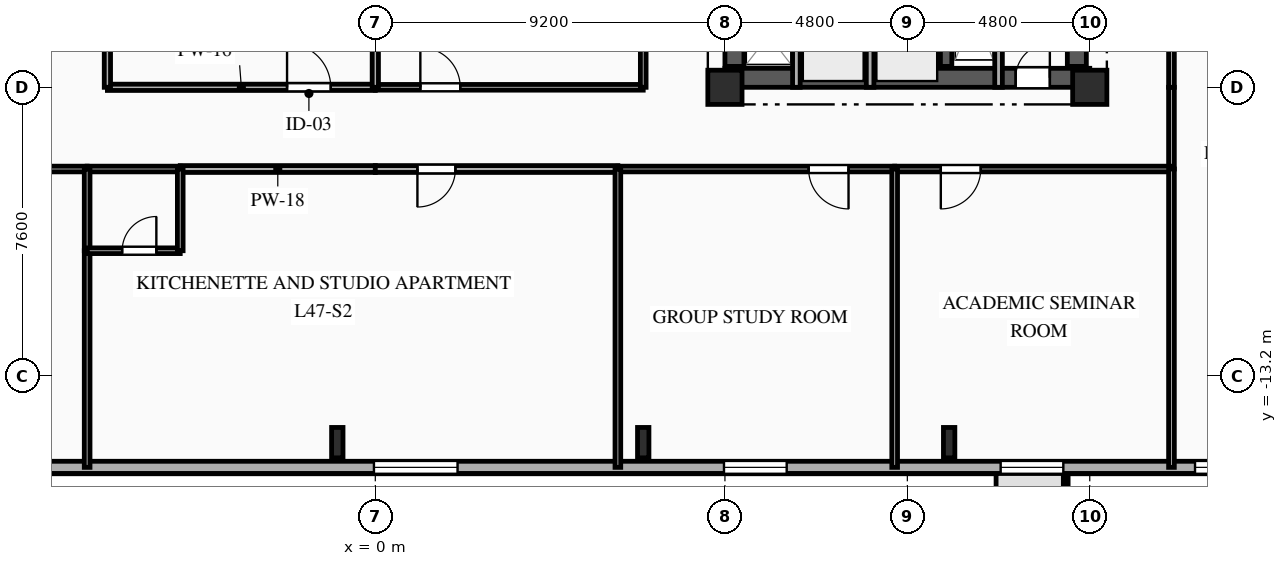
"""IFC4 building model, lengths in metres.
Left out: names, types, materials, properties, quantities, classifications, styles, units other than length and angle.
Written with IfcOpenShell. Run it as: python <this file> out.ifc"""

import sys

from ifc_helpers import new_model, si_unit, direction, frame, frame_2d, origin, origin_2d, place, context, subcontext, project, spatial, rectangle, i_section, extrude, element, fill, save


model = new_model("IFC4")
c1 = context("Model", 3, precision=1e-05, world=origin(), true_north=direction((0.0, 1.0)))
c2 = subcontext(c1, "Body", "Model", "MODEL_VIEW")
j1 = project(units=[si_unit("LENGTHUNIT", "METRE"), si_unit("PLANEANGLEUNIT", "RADIAN")], contexts=[c1])
p1 = place(None, origin())
s1 = spatial("IfcSite", under=j1, at=p1, CompositionType="ELEMENT")
p2 = place(p1, origin())
s2 = spatial("IfcBuilding", under=s1, at=p2, CompositionType="ELEMENT")
p3 = place(p2, frame((0.0, 0.0, 167.85)))
s3 = spatial("IfcBuildingStorey", under=s2, at=p3, CompositionType="ELEMENT", Elevation=167.85)
for number, where, z_axis, x_axis in (
    (1, (9.2, -5.6, 0.0), (0.0, 0.0, 1.0), (1.0, 0.0, 0.0)),
    (2, (18.8, -5.6, 0.0), (0.0, 0.0, 1.0), (1.0, 0.0, 0.0)),
):
    element("IfcColumn", number, at=place(p3, frame(where, z_axis=z_axis, x_axis=x_axis)), inside=s3, PredefinedType="COLUMN", context=c2, shape_type="SweptSolid", body=[
        extrude(rectangle(XDim=0.9, YDim=0.9, at=origin_2d()), origin(), (0.0, 0.0, 1.0), 3.35),
    ])
for number, where, z_axis, x_axis in (
    (3, (-1.0, -14.95, 0.0), (0.0, 0.0, 1.0), (1.0, 0.0, 0.0)),
    (4, (7.05, -14.95, 0.0), (0.0, 0.0, 1.0), (1.0, 0.0, 0.0)),
    (5, (15.1, -14.95, 0.0), (0.0, 0.0, 1.0), (1.0, 0.0, 0.0)),
):
    element("IfcColumn", number, at=place(p3, frame(where, z_axis=z_axis, x_axis=x_axis)), inside=s3, PredefinedType="COLUMN", context=c2, shape_type="SweptSolid", body=[
        extrude(i_section(OverallWidth=0.3, OverallDepth=0.8, WebThickness=0.018, FlangeThickness=0.033, FilletRadius=0.03, at=origin_2d()), origin(), (0.0, 0.0, 1.0), 3.35),
    ])
p4 = place(p3, frame((23.8, -15.6, 0.0), z_axis=(0.0, 0.0, 1.0), x_axis=(-1.0, 0.0, 0.0)))
e6 = element("IfcWall", 6, at=p4, inside=s3, PredefinedType="SOLIDWALL", context=c2, shape_type="SweptSolid", body=[
    extrude(rectangle(XDim=49.6, YDim=0.32, at=frame_2d((24.8, 0.0))), origin(), (0.0, 0.0, 1.0), 3.04),
])
p5 = place(p4, frame((1.13, 0.0, 0.85)))
e7 = element("IfcOpeningElement", 7, at=p5, cuts=e6, PredefinedType="OPENING", context=c2, shape_type="SweptSolid", body=[
    extrude(rectangle(XDim=1.1, YDim=1.85, at=frame_2d((0.55, 0.925))), frame((0.0, 0.17, 0.0), z_axis=(0.0, -1.0, 0.0), x_axis=(1.0, 0.0, 0.0)), (0.0, 0.0, 1.0), 0.34),
])
p6 = place(p4, frame((5.695, 0.0, 0.85)))
e8 = element("IfcOpeningElement", 8, at=p6, cuts=e6, PredefinedType="OPENING", context=c2, shape_type="SweptSolid", body=[
    extrude(rectangle(XDim=1.65, YDim=1.85, at=frame_2d((0.825, 0.925))), frame((0.0, 0.17, 0.0), z_axis=(0.0, -1.0, 0.0), x_axis=(1.0, 0.0, 0.0)), (0.0, 0.0, 1.0), 0.34),
])
p7 = place(p4, frame((12.975, 0.0, 0.85)))
e9 = element("IfcOpeningElement", 9, at=p7, cuts=e6, PredefinedType="OPENING", context=c2, shape_type="SweptSolid", body=[
    extrude(rectangle(XDim=1.65, YDim=1.85, at=frame_2d((0.825, 0.925))), frame((0.0, 0.17, 0.0), z_axis=(0.0, -1.0, 0.0), x_axis=(1.0, 0.0, 0.0)), (0.0, 0.0, 1.0), 0.34),
])
p8 = place(p4, frame((21.636, 0.0, 0.85)))
e10 = element("IfcOpeningElement", 10, at=p8, cuts=e6, PredefinedType="OPENING", context=c2, shape_type="SweptSolid", body=[
    extrude(rectangle(XDim=2.2, YDim=1.85, at=frame_2d((1.1, 0.925))), frame((0.0, 0.17, 0.0), z_axis=(0.0, -1.0, 0.0), x_axis=(1.0, 0.0, 0.0)), (0.0, 0.0, 1.0), 0.34),
])
p9 = place(p4, frame((33.935, 0.0, 0.85)))
e11 = element("IfcOpeningElement", 11, at=p9, cuts=e6, PredefinedType="OPENING", context=c2, shape_type="SweptSolid", body=[
    extrude(rectangle(XDim=1.65, YDim=1.85, at=frame_2d((0.825, 0.925))), frame((0.0, 0.17, 0.0), z_axis=(0.0, -1.0, 0.0), x_axis=(1.0, 0.0, 0.0)), (0.0, 0.0, 1.0), 0.34),
])
p10 = place(p4, frame((41.24, 0.0, 0.85)))
e12 = element("IfcOpeningElement", 12, at=p10, cuts=e6, PredefinedType="OPENING", context=c2, shape_type="SweptSolid", body=[
    extrude(rectangle(XDim=1.65, YDim=1.85, at=frame_2d((0.825, 0.925))), frame((0.0, 0.17, 0.0), z_axis=(0.0, -1.0, 0.0), x_axis=(1.0, 0.0, 0.0)), (0.0, 0.0, 1.0), 0.34),
])
p11 = place(p4, frame((46.175, 0.0, 0.85)))
e13 = element("IfcOpeningElement", 13, at=p11, cuts=e6, PredefinedType="OPENING", context=c2, shape_type="SweptSolid", body=[
    extrude(rectangle(XDim=1.65, YDim=1.85, at=frame_2d((0.825, 0.925))), frame((0.0, 0.17, 0.0), z_axis=(0.0, -1.0, 0.0), x_axis=(1.0, 0.0, 0.0)), (0.0, 0.0, 1.0), 0.34),
])
p12 = place(p3, frame((9.2, -5.35, 0.0), z_axis=(0.0, 0.0, 1.0), x_axis=(1.0, 0.0, 0.0)))
e14 = element("IfcWall", 14, at=p12, inside=s3, PredefinedType="SHEAR", context=c2, shape_type="SweptSolid", body=[
    extrude(rectangle(XDim=9.6, YDim=0.5, at=frame_2d((4.8, 0.0))), origin(), (0.0, 0.0, 1.0), 3.04),
])
p13 = place(p12, frame((7.65, 0.0, 0.0)))
e15 = element("IfcOpeningElement", 15, at=p13, cuts=e14, PredefinedType="OPENING", context=c2, shape_type="SweptSolid", body=[
    extrude(rectangle(XDim=0.9, YDim=2.1, at=frame_2d((0.45, 1.05))), frame((0.0, 0.26, 0.0), z_axis=(0.0, -1.0, 0.0), x_axis=(1.0, 0.0, 0.0)), (0.0, 0.0, 1.0), 0.52),
])
p14 = place(p3, frame((9.45, -5.05, 0.0), z_axis=(0.0, 0.0, 1.0), x_axis=(0.0, 1.0, 0.0)))
e16 = element("IfcWall", 16, at=p14, inside=s3, PredefinedType="SHEAR", context=c2, shape_type="SweptSolid", body=[
    extrude(rectangle(XDim=10.1, YDim=0.5, at=frame_2d((5.05, 0.0))), origin(), (0.0, 0.0, 1.0), 3.04),
])
p15 = place(p14, frame((7.15, 0.0, 0.0)))
e17 = element("IfcOpeningElement", 17, at=p15, cuts=e16, PredefinedType="OPENING", context=c2, shape_type="SweptSolid", body=[
    extrude(rectangle(XDim=0.9, YDim=2.1, at=frame_2d((0.45, 1.05))), frame((0.0, 0.26, 0.0), z_axis=(0.0, -1.0, 0.0), x_axis=(1.0, 0.0, 0.0)), (0.0, 0.0, 1.0), 0.52),
])
p16 = place(p14, frame((2.4, 0.0, 0.0)))
e18 = element("IfcOpeningElement", 18, at=p16, cuts=e16, PredefinedType="OPENING", context=c2, shape_type="SweptSolid", body=[
    extrude(rectangle(XDim=1.2, YDim=2.15, at=frame_2d((0.6, 1.075))), frame((0.0, 0.26, 0.0), z_axis=(0.0, -1.0, 0.0), x_axis=(1.0, 0.0, 0.0)), (0.0, 0.0, 1.0), 0.52),
])
p17 = place(p3, frame((18.46, -5.05, 0.0), z_axis=(0.0, 0.0, 1.0), x_axis=(0.0, 1.0, 0.0)))
e19 = element("IfcWall", 19, at=p17, inside=s3, PredefinedType="SHEAR", context=c2, shape_type="SweptSolid", body=[
    extrude(rectangle(XDim=10.1, YDim=0.5, at=frame_2d((5.05, 0.0))), origin(), (0.0, 0.0, 1.0), 3.04),
])
p18 = place(p3, frame((15.02, -5.05, 0.0), z_axis=(0.0, 0.0, 1.0), x_axis=(0.0, 1.0, 0.0)))
e20 = element("IfcWall", 20, at=p18, inside=s3, PredefinedType="SHEAR", context=c2, shape_type="SweptSolid", body=[
    extrude(rectangle(XDim=10.1, YDim=0.3, at=frame_2d((5.05, 0.0))), origin(), (0.0, 0.0, 1.0), 3.04),
])
p19 = place(p3, frame((16.4, -2.11, 0.0), z_axis=(0.0, 0.0, 1.0), x_axis=(0.0, -1.0, 0.0)))
e21 = element("IfcWall", 21, at=p19, inside=s3, PredefinedType="PARTITIONING", context=c2, shape_type="SweptSolid", body=[
    extrude(rectangle(XDim=3.49, YDim=0.2, at=frame_2d((1.745, 0.0))), origin(), (0.0, 0.0, 1.0), 3.04),
])
for number, where, z_axis, x_axis in (
    (22, (11.08, -5.6, 0.0), (0.0, 0.0, 1.0), (0.0, 1.0, 0.0)),
    (23, (13.02, -5.6, 0.0), (0.0, 0.0, 1.0), (0.0, 1.0, 0.0)),
):
    element("IfcWall", number, at=place(p3, frame(where, z_axis=z_axis, x_axis=x_axis)), inside=s3, PredefinedType="PARTITIONING", context=c2, shape_type="SweptSolid", body=[
        extrude(rectangle(XDim=2.25, YDim=0.2, at=frame_2d((1.125, 0.0))), origin(), (0.0, 0.0, 1.0), 3.04),
    ])
p20 = place(p3, frame((-7.583, -7.75, 0.0), z_axis=(0.0, 0.0, 1.0), x_axis=(-1.0, 0.0, 0.0)))
e24 = element("IfcWall", 24, at=p20, inside=s3, PredefinedType="PARTITIONING", context=c2, shape_type="SweptSolid", body=[
    extrude(rectangle(XDim=6.684, YDim=0.15, at=frame_2d((3.342, 0.0))), origin(), (0.0, 0.0, 1.0), 3.04),
])
p21 = place(p20, frame((4.494, 0.0, 0.0)))
e25 = element("IfcOpeningElement", 25, at=p21, cuts=e24, PredefinedType="OPENING", context=c2, shape_type="SweptSolid", body=[
    extrude(rectangle(XDim=1.05, YDim=2.15, at=frame_2d((0.525, 1.075))), frame((0.0, 0.085, 0.0), z_axis=(0.0, -1.0, 0.0), x_axis=(1.0, 0.0, 0.0)), (0.0, 0.0, 1.0), 0.17),
])
p22 = place(p3, frame((0.0, -7.75, 0.0), z_axis=(0.0, 0.0, 1.0), x_axis=(-1.0, 0.0, 0.0)))
e26 = element("IfcWall", 26, at=p22, inside=s3, PredefinedType="PARTITIONING", context=c2, shape_type="SweptSolid", body=[
    extrude(rectangle(XDim=5.133, YDim=0.18, at=frame_2d((2.566, 0.0))), origin(), (0.0, 0.0, 1.0), 3.04),
])
p23 = place(p3, frame((-5.133, -7.75, 0.0), z_axis=(0.0, 0.0, 1.0), x_axis=(-1.0, 0.0, 0.0)))
e27 = element("IfcWall", 27, at=p23, inside=s3, PredefinedType="PLUMBINGWALL", context=c2, shape_type="SweptSolid", body=[
    extrude(rectangle(XDim=2.45, YDim=0.15, at=frame_2d((1.225, 0.0))), origin(), (0.0, 0.0, 1.0), 3.04),
])
p24 = place(p3, frame((-7.05, -5.6, 0.0), z_axis=(0.0, 0.0, 1.0), x_axis=(1.0, 0.0, 0.0)))
e28 = element("IfcWall", 28, at=p24, inside=s3, PredefinedType="PARTITIONING", context=c2, shape_type="SweptSolid", body=[
    extrude(rectangle(XDim=7.05, YDim=0.165, at=frame_2d((3.525, 0.0))), origin(), (0.0, 0.0, 1.0), 2.525),
])
p25 = place(p24, frame((4.728, 0.0, 0.0)))
e29 = element("IfcOpeningElement", 29, at=p25, cuts=e28, PredefinedType="OPENING", context=c2, shape_type="SweptSolid", body=[
    extrude(rectangle(XDim=1.15, YDim=2.15, at=frame_2d((0.575, 1.075))), frame((0.0, 0.093, 0.0), z_axis=(0.0, -1.0, 0.0), x_axis=(1.0, 0.0, 0.0)), (0.0, 0.0, 1.0), 0.185),
])
p26 = place(p3, frame((20.95, -5.6, 0.0), z_axis=(0.0, 0.0, 1.0), x_axis=(0.0, -1.0, 0.0)))
e30 = element("IfcWall", 30, at=p26, inside=s3, PredefinedType="PARTITIONING", context=c2, shape_type="SweptSolid", body=[
    extrude(rectangle(XDim=2.15, YDim=0.15, at=frame_2d((1.075, 0.0))), origin(), (0.0, 0.0, 1.0), 3.04),
])
p27 = place(p3, frame((6.383, -7.75, 0.0), z_axis=(0.0, 0.0, 1.0), x_axis=(-1.0, 0.0, 0.0)))
e31 = element("IfcWall", 31, at=p27, inside=s3, PredefinedType="PARTITIONING", context=c2, shape_type="SweptSolid", body=[
    extrude(rectangle(XDim=6.383, YDim=0.18, at=frame_2d((3.191, 0.0))), origin(), (0.0, 0.0, 1.0), 3.04),
])
p28 = place(p27, frame((4.275, 0.0, 0.0)))
e32 = element("IfcOpeningElement", 32, at=p28, cuts=e31, PredefinedType="OPENING", context=c2, shape_type="SweptSolid", body=[
    extrude(rectangle(XDim=1.0, YDim=2.15, at=frame_2d((0.5, 1.075))), frame((0.0, 0.1, 0.0), z_axis=(0.0, -1.0, 0.0), x_axis=(1.0, 0.0, 0.0)), (0.0, 0.0, 1.0), 0.2),
])
p29 = place(p3, frame((13.667, -7.75, 0.0), z_axis=(0.0, 0.0, 1.0), x_axis=(-1.0, 0.0, 0.0)))
e33 = element("IfcWall", 33, at=p29, inside=s3, PredefinedType="PARTITIONING", context=c2, shape_type="SweptSolid", body=[
    extrude(rectangle(XDim=7.283, YDim=0.15, at=frame_2d((3.642, 0.0))), origin(), (0.0, 0.0, 1.0), 3.04),
])
p30 = place(p29, frame((1.214, 0.0, 0.0)))
e34 = element("IfcOpeningElement", 34, at=p30, cuts=e33, PredefinedType="OPENING", context=c2, shape_type="SweptSolid", body=[
    extrude(rectangle(XDim=1.05, YDim=2.15, at=frame_2d((0.525, 1.075))), frame((0.0, 0.085, 0.0), z_axis=(0.0, -1.0, 0.0), x_axis=(1.0, 0.0, 0.0)), (0.0, 0.0, 1.0), 0.17),
])
p31 = place(p3, frame((20.95, -7.75, 0.0), z_axis=(0.0, 0.0, 1.0), x_axis=(-1.0, 0.0, 0.0)))
e35 = element("IfcWall", 35, at=p31, inside=s3, PredefinedType="PARTITIONING", context=c2, shape_type="SweptSolid", body=[
    extrude(rectangle(XDim=7.283, YDim=0.15, at=frame_2d((3.642, 0.0))), origin(), (0.0, 0.0, 1.0), 3.04),
])
p32 = place(p31, frame((5.019, 0.0, 0.0)))
e36 = element("IfcOpeningElement", 36, at=p32, cuts=e35, PredefinedType="OPENING", context=c2, shape_type="SweptSolid", body=[
    extrude(rectangle(XDim=1.05, YDim=2.15, at=frame_2d((0.525, 1.075))), frame((0.0, 0.085, 0.0), z_axis=(0.0, -1.0, 0.0), x_axis=(1.0, 0.0, 0.0)), (0.0, 0.0, 1.0), 0.17),
])
p33 = place(p3, frame((0.0, -5.6, 0.0), z_axis=(0.0, 0.0, 1.0), x_axis=(1.0, 0.0, 0.0)))
e37 = element("IfcWall", 37, at=p33, inside=s3, PredefinedType="PARTITIONING", context=c2, shape_type="SweptSolid", body=[
    extrude(rectangle(XDim=7.05, YDim=0.15, at=frame_2d((3.525, 0.0))), origin(), (0.0, 0.0, 1.0), 2.525),
])
p34 = place(p33, frame((1.185, 0.0, 0.0)))
e38 = element("IfcOpeningElement", 38, at=p34, cuts=e37, PredefinedType="OPENING", context=c2, shape_type="SweptSolid", body=[
    extrude(rectangle(XDim=1.05, YDim=2.15, at=frame_2d((0.525, 1.075))), frame((0.0, 0.085, 0.0), z_axis=(0.0, -1.0, 0.0), x_axis=(1.0, 0.0, 0.0)), (0.0, 0.0, 1.0), 0.17),
])
p35 = place(p3, frame((20.95, 2.4, 0.0), z_axis=(0.0, 0.0, 1.0), x_axis=(0.0, -1.0, 0.0)))
e39 = element("IfcWall", 39, at=p35, inside=s3, PredefinedType="PARTITIONING", context=c2, shape_type="SweptSolid", body=[
    extrude(rectangle(XDim=8.0, YDim=0.15, at=frame_2d((4.0, 0.0))), origin(), (0.0, 0.0, 1.0), 3.04),
])
p36 = place(p35, frame((2.028, 0.0, 0.0)))
e40 = element("IfcOpeningElement", 40, at=p36, cuts=e39, PredefinedType="OPENING", context=c2, shape_type="SweptSolid", body=[
    extrude(rectangle(XDim=1.05, YDim=2.15, at=frame_2d((0.525, 1.075))), frame((0.0, 0.085, 0.0), z_axis=(0.0, -1.0, 0.0), x_axis=(1.0, 0.0, 0.0)), (0.0, 0.0, 1.0), 0.17),
])
p37 = place(p3, frame((-7.05, -2.95, 0.0), z_axis=(0.0, 0.0, 1.0), x_axis=(0.0, -1.0, 0.0)))
e41 = element("IfcWall", 41, at=p37, inside=s3, PredefinedType="PARTITIONING", context=c2, shape_type="SweptSolid", body=[
    extrude(rectangle(XDim=2.65, YDim=0.165, at=frame_2d((1.325, 0.0))), origin(), (0.0, 0.0, 1.0), 3.04),
])
p38 = place(p3, frame((7.05, -5.6, 0.0), z_axis=(0.0, 0.0, 1.0), x_axis=(0.0, 1.0, 0.0)))
e42 = element("IfcWall", 42, at=p38, inside=s3, PredefinedType="PARTITIONING", context=c2, shape_type="SweptSolid", body=[
    extrude(rectangle(XDim=2.65, YDim=0.15, at=frame_2d((1.325, 0.0))), origin(), (0.0, 0.0, 1.0), 3.04),
])
p39 = place(p3, frame((20.95, -15.6, 0.0), z_axis=(0.0, 0.0, 1.0), x_axis=(0.0, 1.0, 0.0)))
e43 = element("IfcWall", 43, at=p39, inside=s3, PredefinedType="PARTITIONING", context=c2, shape_type="SweptSolid", body=[
    extrude(rectangle(XDim=7.85, YDim=0.15, at=frame_2d((3.925, 0.0))), origin(), (0.0, 0.0, 1.0), 3.04),
])
p40 = place(p3, frame((-7.583, -9.9, 0.0), z_axis=(0.0, 0.0, 1.0), x_axis=(0.0, -1.0, 0.0)))
e44 = element("IfcWall", 44, at=p40, inside=s3, PredefinedType="PARTITIONING", context=c2, shape_type="SweptSolid", body=[
    extrude(rectangle(XDim=5.7, YDim=0.15, at=frame_2d((2.85, 0.0))), origin(), (0.0, 0.0, 1.0), 3.04),
])
p41 = place(p3, frame((-7.583, -7.75, 0.0), z_axis=(0.0, 0.0, 1.0), x_axis=(0.0, -1.0, 0.0)))
e45 = element("IfcWall", 45, at=p41, inside=s3, PredefinedType="PLUMBINGWALL", context=c2, shape_type="SweptSolid", body=[
    extrude(rectangle(XDim=2.15, YDim=0.15, at=frame_2d((1.075, 0.0))), origin(), (0.0, 0.0, 1.0), 3.04),
])
p42 = place(p3, frame((-7.583, -9.9, 0.0), z_axis=(0.0, 0.0, 1.0), x_axis=(1.0, 0.0, 0.0)))
e46 = element("IfcWall", 46, at=p42, inside=s3, PredefinedType="PLUMBINGWALL", context=c2, shape_type="SweptSolid", body=[
    extrude(rectangle(XDim=2.45, YDim=0.15, at=frame_2d((1.225, 0.0))), origin(), (0.0, 0.0, 1.0), 3.04),
])
p43 = place(p42, frame((0.921, 0.0, 0.0)))
e47 = element("IfcOpeningElement", 47, at=p43, cuts=e46, PredefinedType="OPENING", context=c2, shape_type="SweptSolid", body=[
    extrude(rectangle(XDim=0.9, YDim=2.1, at=frame_2d((0.45, 1.05))), frame((0.0, 0.085, 0.0), z_axis=(0.0, -1.0, 0.0), x_axis=(1.0, 0.0, 0.0)), (0.0, 0.0, 1.0), 0.17),
])
p44 = place(p3, frame((-5.133, -9.9, 0.0), z_axis=(0.0, 0.0, 1.0), x_axis=(0.0, 1.0, 0.0)))
e48 = element("IfcWall", 48, at=p44, inside=s3, PredefinedType="PLUMBINGWALL", context=c2, shape_type="SweptSolid", body=[
    extrude(rectangle(XDim=2.15, YDim=0.15, at=frame_2d((1.075, 0.0))), origin(), (0.0, 0.0, 1.0), 3.04),
])
for number, where, z_axis, x_axis in (
    (49, (6.383, -7.75, 0.0), (0.0, 0.0, 1.0), (0.0, -1.0, 0.0)),
    (50, (13.667, -7.75, 0.0), (0.0, 0.0, 1.0), (0.0, -1.0, 0.0)),
):
    element("IfcWall", number, at=place(p3, frame(where, z_axis=z_axis, x_axis=x_axis)), inside=s3, PredefinedType="PARTITIONING", context=c2, shape_type="SweptSolid", body=[
        extrude(rectangle(XDim=7.85, YDim=0.15, at=frame_2d((3.925, 0.0))), origin(), (0.0, 0.0, 1.0), 3.04),
    ])
p45 = place(p3, frame((0.0, -2.95, 0.0), z_axis=(0.0, 0.0, 1.0), x_axis=(0.0, -1.0, 0.0)))
e51 = element("IfcWall", 51, at=p45, inside=s3, PredefinedType="PARTITIONING", context=c2, shape_type="SweptSolid", body=[
    extrude(rectangle(XDim=2.65, YDim=0.165, at=frame_2d((1.325, 0.0))), origin(), (0.0, 0.0, 1.0), 3.04),
])
p46 = place(p5, origin())
e52 = element("IfcWindow", 52, at=p46, inside=s3, PartitioningType="SINGLE_PANEL", PredefinedType="WINDOW", context=c2, shape_type="SweptSolid", body=[
    extrude(rectangle(XDim=1.1, YDim=1.85, at=frame_2d((0.55, 0.925))), frame((0.0, 0.03, 0.0), z_axis=(0.0, -1.0, 0.0), x_axis=(1.0, 0.0, 0.0)), (0.0, 0.0, 1.0), 0.06),
])
fill(e7, e52)
p47 = place(p6, origin())
e53 = element("IfcWindow", 53, at=p47, inside=s3, PartitioningType="SINGLE_PANEL", PredefinedType="WINDOW", context=c2, shape_type="SweptSolid", body=[
    extrude(rectangle(XDim=1.65, YDim=1.85, at=frame_2d((0.825, 0.925))), frame((0.0, 0.03, 0.0), z_axis=(0.0, -1.0, 0.0), x_axis=(1.0, 0.0, 0.0)), (0.0, 0.0, 1.0), 0.06),
])
fill(e8, e53)
p48 = place(p7, origin())
e54 = element("IfcWindow", 54, at=p48, inside=s3, PartitioningType="SINGLE_PANEL", PredefinedType="WINDOW", context=c2, shape_type="SweptSolid", body=[
    extrude(rectangle(XDim=1.65, YDim=1.85, at=frame_2d((0.825, 0.925))), frame((0.0, 0.03, 0.0), z_axis=(0.0, -1.0, 0.0), x_axis=(1.0, 0.0, 0.0)), (0.0, 0.0, 1.0), 0.06),
])
fill(e9, e54)
p49 = place(p8, origin())
e55 = element("IfcWindow", 55, at=p49, inside=s3, PartitioningType="SINGLE_PANEL", PredefinedType="WINDOW", context=c2, shape_type="SweptSolid", body=[
    extrude(rectangle(XDim=2.2, YDim=1.85, at=frame_2d((1.1, 0.925))), frame((0.0, 0.03, 0.0), z_axis=(0.0, -1.0, 0.0), x_axis=(1.0, 0.0, 0.0)), (0.0, 0.0, 1.0), 0.06),
])
fill(e10, e55)
p50 = place(p13, origin())
e56 = element("IfcDoor", 56, at=p50, inside=s3, OperationType="SINGLE_SWING_RIGHT", PredefinedType="DOOR", context=c2, shape_type="SweptSolid", body=[
    extrude(rectangle(XDim=0.9, YDim=2.1, at=frame_2d((0.45, 1.05))), frame((0.0, 0.025, 0.0), z_axis=(0.0, -1.0, 0.0), x_axis=(1.0, 0.0, 0.0)), (0.0, 0.0, 1.0), 0.05),
])
fill(e15, e56)
p51 = place(p25, origin())
e57 = element("IfcDoor", 57, at=p51, inside=s3, OperationType="SINGLE_SWING_LEFT", PredefinedType="DOOR", context=c2, shape_type="SweptSolid", body=[
    extrude(rectangle(XDim=1.15, YDim=2.15, at=frame_2d((0.575, 1.075))), frame((0.0, 0.025, 0.0), z_axis=(0.0, -1.0, 0.0), x_axis=(1.0, 0.0, 0.0)), (0.0, 0.0, 1.0), 0.05),
])
fill(e29, e57)
p52 = place(p28, origin())
e58 = element("IfcDoor", 58, at=p52, inside=s3, OperationType="SINGLE_SWING_RIGHT", PredefinedType="DOOR", context=c2, shape_type="SweptSolid", body=[
    extrude(rectangle(XDim=1.0, YDim=2.15, at=frame_2d((0.5, 1.075))), frame((0.0, 0.025, 0.0), z_axis=(0.0, -1.0, 0.0), x_axis=(1.0, 0.0, 0.0)), (0.0, 0.0, 1.0), 0.05),
])
fill(e32, e58)
p53 = place(p30, origin())
e59 = element("IfcDoor", 59, at=p53, inside=s3, OperationType="SINGLE_SWING_LEFT", PredefinedType="DOOR", context=c2, shape_type="SweptSolid", body=[
    extrude(rectangle(XDim=1.05, YDim=2.15, at=frame_2d((0.525, 1.075))), frame((0.0, 0.025, 0.0), z_axis=(0.0, -1.0, 0.0), x_axis=(1.0, 0.0, 0.0)), (0.0, 0.0, 1.0), 0.05),
])
fill(e34, e59)
p54 = place(p32, origin())
e60 = element("IfcDoor", 60, at=p54, inside=s3, OperationType="SINGLE_SWING_RIGHT", PredefinedType="DOOR", context=c2, shape_type="SweptSolid", body=[
    extrude(rectangle(XDim=1.05, YDim=2.15, at=frame_2d((0.525, 1.075))), frame((0.0, 0.025, 0.0), z_axis=(0.0, -1.0, 0.0), x_axis=(1.0, 0.0, 0.0)), (0.0, 0.0, 1.0), 0.05),
])
fill(e36, e60)
p55 = place(p34, origin())
e61 = element("IfcDoor", 61, at=p55, inside=s3, OperationType="SINGLE_SWING_LEFT", PredefinedType="DOOR", context=c2, shape_type="SweptSolid", body=[
    extrude(rectangle(XDim=1.05, YDim=2.15, at=frame_2d((0.525, 1.075))), frame((0.0, 0.025, 0.0), z_axis=(0.0, -1.0, 0.0), x_axis=(1.0, 0.0, 0.0)), (0.0, 0.0, 1.0), 0.05),
])
fill(e38, e61)
p56 = place(p43, origin())
e62 = element("IfcDoor", 62, at=p56, inside=s3, OperationType="SINGLE_SWING_RIGHT", PredefinedType="DOOR", context=c2, shape_type="SweptSolid", body=[
    extrude(rectangle(XDim=0.9, YDim=2.1, at=frame_2d((0.45, 1.05))), frame((0.0, 0.025, 0.0), z_axis=(0.0, -1.0, 0.0), x_axis=(1.0, 0.0, 0.0)), (0.0, 0.0, 1.0), 0.05),
])
fill(e47, e62)
save(model, sys.argv[1])
